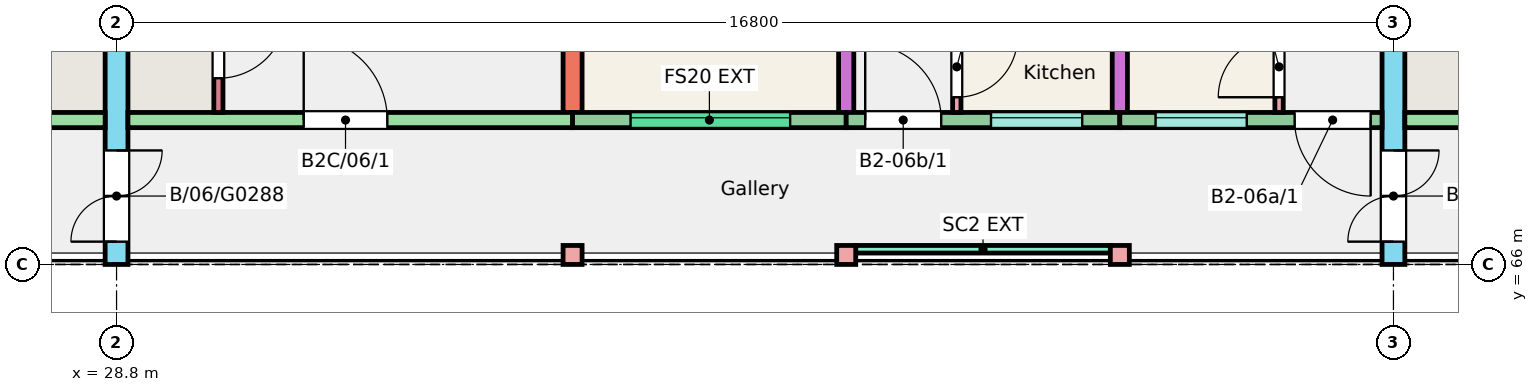
"""IFC4 building model, lengths in metres.
Left out: names, types, materials, properties, quantities, classifications, styles, units other than length and angle.
Written with IfcOpenShell. Run it as: python <this file> out.ifc"""

import sys

from ifc_helpers import new_model, si_unit, direction, frame, frame_2d, origin, origin_2d, place, context, subcontext, project, spatial, rectangle, extrude, element, fill, save


model = new_model("IFC4")
c1 = context("Model", 3, precision=1e-05, world=origin(), true_north=direction((0.0, 1.0)))
c2 = subcontext(c1, "Body", "Model", "MODEL_VIEW")
j1 = project(units=[si_unit("LENGTHUNIT", "METRE"), si_unit("PLANEANGLEUNIT", "RADIAN")], contexts=[c1])
p1 = place(None, origin())
s1 = spatial("IfcSite", under=j1, at=p1, CompositionType="ELEMENT")
p2 = place(p1, origin())
s2 = spatial("IfcBuilding", under=s1, at=p2, CompositionType="ELEMENT")
p3 = place(p2, frame((0.0, 0.0, 18.0)))
s3 = spatial("IfcBuildingStorey", under=s2, at=p3, CompositionType="ELEMENT", Elevation=18.0)
p4 = place(p3, frame((28.8, 66.0, 0.0), z_axis=(0.0, 0.0, 1.0), x_axis=(0.0, 1.0, 0.0)))
e1 = element("IfcWall", 1, at=p4, inside=s3, PredefinedType="SHEAR", context=c2, shape_type="SweptSolid", body=[
    extrude(rectangle(XDim=11.0, YDim=0.3, at=frame_2d((5.5, 0.0))), origin(), (0.0, 0.0, 1.0), 3.0),
])
p5 = place(p4, frame((0.3, 0.0, 0.0)))
e2 = element("IfcOpeningElement", 2, at=p5, cuts=e1, PredefinedType="OPENING", context=c2, shape_type="SweptSolid", body=[
    extrude(rectangle(XDim=1.2, YDim=2.1, at=frame_2d((0.6, 1.05))), frame((0.0, 0.16, 0.0), z_axis=(0.0, -1.0, 0.0), x_axis=(1.0, 0.0, 0.0)), (0.0, 0.0, 1.0), 0.32),
])
p6 = place(p3, frame((34.8, 68.0, 0.0), z_axis=(0.0, 0.0, 1.0), x_axis=(0.0, 1.0, 0.0)))
e3 = element("IfcWall", 3, at=p6, inside=s3, PredefinedType="SHEAR", context=c2, shape_type="SweptSolid", body=[
    extrude(rectangle(XDim=9.0, YDim=0.25, at=frame_2d((4.5, 0.0))), origin(), (0.0, 0.0, 1.0), 3.0),
])
p7 = place(p3, frame((38.4, 68.0, 0.0), z_axis=(0.0, 0.0, 1.0), x_axis=(0.0, 1.0, 0.0)))
e4 = element("IfcWall", 4, at=p7, inside=s3, PredefinedType="SHEAR", context=c2, shape_type="SweptSolid", body=[
    extrude(rectangle(XDim=9.0, YDim=0.2, at=frame_2d((4.5, 0.0))), origin(), (0.0, 0.0, 1.0), 3.0),
])
p8 = place(p7, frame((2.4, 0.0, 0.0)))
e5 = element("IfcOpeningElement", 5, at=p8, cuts=e4, PredefinedType="OPENING", context=c2, shape_type="SweptSolid", body=[
    extrude(rectangle(XDim=1.2, YDim=2.1, at=frame_2d((0.6, 1.05))), frame((0.0, 0.11, 0.0), z_axis=(0.0, -1.0, 0.0), x_axis=(1.0, 0.0, 0.0)), (0.0, 0.0, 1.0), 0.22),
])
p9 = place(p7, frame((6.4, 0.0, 0.0)))
e6 = element("IfcOpeningElement", 6, at=p9, cuts=e4, PredefinedType="OPENING", context=c2, shape_type="SweptSolid", body=[
    extrude(rectangle(XDim=1.2, YDim=2.1, at=frame_2d((0.6, 1.05))), frame((0.0, 0.11, 0.0), z_axis=(0.0, -1.0, 0.0), x_axis=(1.0, 0.0, 0.0)), (0.0, 0.0, 1.0), 0.22),
])
p10 = place(p3, frame((42.0, 68.0, 0.0), z_axis=(0.0, 0.0, 1.0), x_axis=(0.0, 1.0, 0.0)))
e7 = element("IfcWall", 7, at=p10, inside=s3, PredefinedType="SHEAR", context=c2, shape_type="SweptSolid", body=[
    extrude(rectangle(XDim=9.0, YDim=0.2, at=frame_2d((4.5, 0.0))), origin(), (0.0, 0.0, 1.0), 3.0),
])
p11 = place(p3, frame((45.6, 66.0, 0.0), z_axis=(0.0, 0.0, 1.0), x_axis=(0.0, 1.0, 0.0)))
e8 = element("IfcWall", 8, at=p11, inside=s3, PredefinedType="SHEAR", context=c2, shape_type="SweptSolid", body=[
    extrude(rectangle(XDim=11.0, YDim=0.3, at=frame_2d((5.5, 0.0))), origin(), (0.0, 0.0, 1.0), 3.0),
])
p12 = place(p11, frame((0.3, 0.0, 0.0)))
e9 = element("IfcOpeningElement", 9, at=p12, cuts=e8, PredefinedType="OPENING", context=c2, shape_type="SweptSolid", body=[
    extrude(rectangle(XDim=1.2, YDim=2.1, at=frame_2d((0.6, 1.05))), frame((0.0, 0.16, 0.0), z_axis=(0.0, -1.0, 0.0), x_axis=(1.0, 0.0, 0.0)), (0.0, 0.0, 1.0), 0.32),
])
p13 = place(p3, frame((22.8, 67.9, 0.0), z_axis=(0.0, 0.0, 1.0), x_axis=(1.0, 0.0, 0.0)))
e10 = element("IfcWall", 10, at=p13, inside=s3, PredefinedType="SHEAR", context=c2, shape_type="SweptSolid", body=[
    extrude(rectangle(XDim=5.85, YDim=0.2, at=frame_2d((2.925, 0.0))), origin(), (0.0, 0.0, 1.0), 3.0),
])
p14 = place(p13, frame((2.438, 0.0, 0.0)))
e11 = element("IfcOpeningElement", 11, at=p14, cuts=e10, PredefinedType="OPENING", context=c2, shape_type="SweptSolid", body=[
    extrude(rectangle(XDim=1.1, YDim=2.1, at=frame_2d((0.55, 1.05))), frame((0.0, 0.11, 0.0), z_axis=(0.0, -1.0, 0.0), x_axis=(1.0, 0.0, 0.0)), (0.0, 0.0, 1.0), 0.22),
])
p15 = place(p3, frame((28.95, 67.9, 0.0), z_axis=(0.0, 0.0, 1.0), x_axis=(1.0, 0.0, 0.0)))
e12 = element("IfcWall", 12, at=p15, inside=s3, PredefinedType="SHEAR", context=c2, shape_type="SweptSolid", body=[
    extrude(rectangle(XDim=5.85, YDim=0.2, at=frame_2d((2.925, 0.0))), origin(), (0.0, 0.0, 1.0), 3.0),
])
p16 = place(p15, frame((2.312, 0.0, 0.0)))
e13 = element("IfcOpeningElement", 13, at=p16, cuts=e12, PredefinedType="OPENING", context=c2, shape_type="SweptSolid", body=[
    extrude(rectangle(XDim=1.1, YDim=2.1, at=frame_2d((0.55, 1.05))), frame((0.0, 0.11, 0.0), z_axis=(0.0, -1.0, 0.0), x_axis=(1.0, 0.0, 0.0)), (0.0, 0.0, 1.0), 0.22),
])
p17 = place(p3, frame((30.14, 68.0, 0.0), z_axis=(0.0, 0.0, 1.0), x_axis=(0.0, 1.0, 0.0)))
e14 = element("IfcWall", 14, at=p17, inside=s3, PredefinedType="SHEAR", context=c2, shape_type="SweptSolid", body=[
    extrude(rectangle(XDim=1.72, YDim=0.12, at=frame_2d((0.86, 0.0))), origin(), (0.0, 0.0, 1.0), 3.0),
])
p18 = place(p17, frame((0.45, 0.0, 0.0)))
e15 = element("IfcOpeningElement", 15, at=p18, cuts=e14, PredefinedType="OPENING", context=c2, shape_type="SweptSolid", body=[
    extrude(rectangle(XDim=0.9, YDim=2.1, at=frame_2d((0.45, 1.05))), frame((0.0, 0.07, 0.0), z_axis=(0.0, -1.0, 0.0), x_axis=(1.0, 0.0, 0.0)), (0.0, 0.0, 1.0), 0.14),
])
p19 = place(p3, frame((34.8, 67.9, 0.0), z_axis=(0.0, 0.0, 1.0), x_axis=(1.0, 0.0, 0.0)))
e16 = element("IfcWall", 16, at=p19, inside=s3, PredefinedType="SOLIDWALL", context=c2, shape_type="SweptSolid", body=[
    extrude(rectangle(XDim=3.6, YDim=0.2, at=frame_2d((1.8, 0.0))), origin(), (0.0, 0.0, 1.0), 3.0),
])
p20 = place(p19, frame((0.762, 0.0, 1.2)))
e17 = element("IfcOpeningElement", 17, at=p20, cuts=e16, PredefinedType="OPENING", context=c2, shape_type="SweptSolid", body=[
    extrude(rectangle(XDim=2.1, YDim=1.2, at=frame_2d((1.05, 0.6))), frame((0.0, 0.11, 0.0), z_axis=(0.0, -1.0, 0.0), x_axis=(1.0, 0.0, 0.0)), (0.0, 0.0, 1.0), 0.22),
])
p21 = place(p3, frame((38.4, 67.9, 0.0), z_axis=(0.0, 0.0, 1.0), x_axis=(1.0, 0.0, 0.0)))
e18 = element("IfcWall", 18, at=p21, inside=s3, PredefinedType="SOLIDWALL", context=c2, shape_type="SweptSolid", body=[
    extrude(rectangle(XDim=3.6, YDim=0.2, at=frame_2d((1.8, 0.0))), origin(), (0.0, 0.0, 1.0), 3.0),
])
p22 = place(p21, frame((1.905, 0.0, 1.1)))
e19 = element("IfcOpeningElement", 19, at=p22, cuts=e18, PredefinedType="OPENING", context=c2, shape_type="SweptSolid", body=[
    extrude(rectangle(XDim=1.2, YDim=1.3, at=frame_2d((0.6, 0.65))), frame((0.0, 0.11, 0.0), z_axis=(0.0, -1.0, 0.0), x_axis=(1.0, 0.0, 0.0)), (0.0, 0.0, 1.0), 0.22),
])
p23 = place(p21, frame((0.25, 0.0, 0.0)))
e20 = element("IfcOpeningElement", 20, at=p23, cuts=e18, PredefinedType="OPENING", context=c2, shape_type="SweptSolid", body=[
    extrude(rectangle(XDim=1.0, YDim=2.1, at=frame_2d((0.5, 1.05))), frame((0.0, 0.11, 0.0), z_axis=(0.0, -1.0, 0.0), x_axis=(1.0, 0.0, 0.0)), (0.0, 0.0, 1.0), 0.22),
])
p24 = place(p3, frame((42.0, 67.9, 0.0), z_axis=(0.0, 0.0, 1.0), x_axis=(1.0, 0.0, 0.0)))
e21 = element("IfcWall", 21, at=p24, inside=s3, PredefinedType="SOLIDWALL", context=c2, shape_type="SweptSolid", body=[
    extrude(rectangle(XDim=3.45, YDim=0.2, at=frame_2d((1.725, 0.0))), origin(), (0.0, 0.0, 1.0), 3.0),
])
p25 = place(p24, frame((0.47, 0.0, 1.1)))
e22 = element("IfcOpeningElement", 22, at=p25, cuts=e21, PredefinedType="OPENING", context=c2, shape_type="SweptSolid", body=[
    extrude(rectangle(XDim=1.2, YDim=1.3, at=frame_2d((0.6, 0.65))), frame((0.0, 0.11, 0.0), z_axis=(0.0, -1.0, 0.0), x_axis=(1.0, 0.0, 0.0)), (0.0, 0.0, 1.0), 0.22),
])
p26 = place(p24, frame((2.3, 0.0, 0.0)))
e23 = element("IfcOpeningElement", 23, at=p26, cuts=e21, PredefinedType="OPENING", context=c2, shape_type="SweptSolid", body=[
    extrude(rectangle(XDim=1.0, YDim=2.1, at=frame_2d((0.5, 1.05))), frame((0.0, 0.11, 0.0), z_axis=(0.0, -1.0, 0.0), x_axis=(1.0, 0.0, 0.0)), (0.0, 0.0, 1.0), 0.22),
])
p27 = place(p3, frame((45.75, 67.9, 0.0), z_axis=(0.0, 0.0, 1.0), x_axis=(1.0, 0.0, 0.0)))
e24 = element("IfcWall", 24, at=p27, inside=s3, PredefinedType="SHEAR", context=c2, shape_type="SweptSolid", body=[
    extrude(rectangle(XDim=5.85, YDim=0.2, at=frame_2d((2.925, 0.0))), origin(), (0.0, 0.0, 1.0), 3.0),
])
p28 = place(p27, frame((2.312, 0.0, 0.0)))
e25 = element("IfcOpeningElement", 25, at=p28, cuts=e24, PredefinedType="OPENING", context=c2, shape_type="SweptSolid", body=[
    extrude(rectangle(XDim=1.1, YDim=2.1, at=frame_2d((0.55, 1.05))), frame((0.0, 0.11, 0.0), z_axis=(0.0, -1.0, 0.0), x_axis=(1.0, 0.0, 0.0)), (0.0, 0.0, 1.0), 0.22),
])
for number, where, z_axis, x_axis in (
    (26, (34.8, 66.125, 0.0), (0.0, 0.0, 1.0), (1.0, 0.0, 0.0)),
    (27, (38.4, 66.125, 0.0), (0.0, 0.0, 1.0), (1.0, 0.0, 0.0)),
    (28, (42.0, 66.125, 0.0), (0.0, 0.0, 1.0), (1.0, 0.0, 0.0)),
):
    element("IfcColumn", number, at=place(p3, frame(where, z_axis=z_axis, x_axis=x_axis)), inside=s3, PredefinedType="COLUMN", context=c2, shape_type="SweptSolid", body=[
        extrude(rectangle(XDim=0.25, YDim=0.25, at=origin_2d()), origin(), (0.0, 0.0, 1.0), 3.0),
    ])
p29 = place(p3, frame((38.525, 66.2, 0.0), z_axis=(0.0, 0.0, 1.0), x_axis=(1.0, 0.0, 0.0)))
e29 = element("IfcWall", 29, at=p29, inside=s3, PredefinedType="SOLIDWALL", context=c2, shape_type="SweptSolid", body=[
    extrude(rectangle(XDim=3.35, YDim=0.1, at=frame_2d((1.675, 0.0))), origin(), (0.0, 0.0, 1.0), 2.45),
])
p30 = place(p3, frame((44.095, 68.0, 0.0), z_axis=(0.0, 0.0, 1.0), x_axis=(0.0, 1.0, 0.0)))
e30 = element("IfcWall", 30, at=p30, inside=s3, PredefinedType="PARTITIONING", context=c2, shape_type="SweptSolid", body=[
    extrude(rectangle(XDim=4.5, YDim=0.11, at=frame_2d((2.25, 0.0))), origin(), (0.0, 0.0, 1.0), 2.8),
])
p31 = place(p30, frame((0.2, 0.0, 0.0)))
e31 = element("IfcOpeningElement", 31, at=p31, cuts=e30, PredefinedType="OPENING", context=c2, shape_type="SweptSolid", body=[
    extrude(rectangle(XDim=0.8, YDim=2.1, at=frame_2d((0.4, 1.05))), frame((0.0, 0.065, 0.0), z_axis=(0.0, -1.0, 0.0), x_axis=(1.0, 0.0, 0.0)), (0.0, 0.0, 1.0), 0.13),
])
p32 = place(p30, frame((3.55, 0.0, 0.0)))
e32 = element("IfcOpeningElement", 32, at=p32, cuts=e30, PredefinedType="OPENING", context=c2, shape_type="SweptSolid", body=[
    extrude(rectangle(XDim=0.8, YDim=2.1, at=frame_2d((0.4, 1.05))), frame((0.0, 0.065, 0.0), z_axis=(0.0, -1.0, 0.0), x_axis=(1.0, 0.0, 0.0)), (0.0, 0.0, 1.0), 0.13),
])
p33 = place(p3, frame((39.855, 68.0, 0.0), z_axis=(0.0, 0.0, 1.0), x_axis=(0.0, 1.0, 0.0)))
e33 = element("IfcWall", 33, at=p33, inside=s3, PredefinedType="PARTITIONING", context=c2, shape_type="SweptSolid", body=[
    extrude(rectangle(XDim=4.3, YDim=0.11, at=frame_2d((2.15, 0.0))), origin(), (0.0, 0.0, 1.0), 2.8),
])
p34 = place(p33, frame((0.2, 0.0, 0.0)))
e34 = element("IfcOpeningElement", 34, at=p34, cuts=e33, PredefinedType="OPENING", context=c2, shape_type="SweptSolid", body=[
    extrude(rectangle(XDim=0.8, YDim=2.1, at=frame_2d((0.4, 1.05))), frame((0.0, 0.065, 0.0), z_axis=(0.0, -1.0, 0.0), x_axis=(1.0, 0.0, 0.0)), (0.0, 0.0, 1.0), 0.13),
])
p35 = place(p33, frame((3.35, 0.0, 0.0)))
e35 = element("IfcOpeningElement", 35, at=p35, cuts=e33, PredefinedType="OPENING", context=c2, shape_type="SweptSolid", body=[
    extrude(rectangle(XDim=0.8, YDim=2.1, at=frame_2d((0.4, 1.05))), frame((0.0, 0.065, 0.0), z_axis=(0.0, -1.0, 0.0), x_axis=(1.0, 0.0, 0.0)), (0.0, 0.0, 1.0), 0.13),
])
p36 = place(p25, origin())
e36 = element("IfcWindow", 36, at=p36, inside=s3, PartitioningType="SINGLE_PANEL", PredefinedType="WINDOW", context=c2, shape_type="SweptSolid", body=[
    extrude(rectangle(XDim=1.2, YDim=1.3, at=frame_2d((0.6, 0.65))), frame((0.0, 0.06, 0.0), z_axis=(0.0, -1.0, 0.0), x_axis=(1.0, 0.0, 0.0)), (0.0, 0.0, 1.0), 0.06),
])
fill(e22, e36)
p37 = place(p20, origin())
e37 = element("IfcWindow", 37, at=p37, inside=s3, PartitioningType="SINGLE_PANEL", PredefinedType="WINDOW", context=c2, shape_type="SweptSolid", body=[
    extrude(rectangle(XDim=2.1, YDim=1.2, at=frame_2d((1.05, 0.6))), frame((0.0, 0.06, 0.0), z_axis=(0.0, -1.0, 0.0), x_axis=(1.0, 0.0, 0.0)), (0.0, 0.0, 1.0), 0.06),
])
fill(e17, e37)
p38 = place(p22, origin())
e38 = element("IfcWindow", 38, at=p38, inside=s3, PartitioningType="SINGLE_PANEL", PredefinedType="WINDOW", context=c2, shape_type="SweptSolid", body=[
    extrude(rectangle(XDim=1.2, YDim=1.3, at=frame_2d((0.6, 0.65))), frame((0.0, 0.06, 0.0), z_axis=(0.0, -1.0, 0.0), x_axis=(1.0, 0.0, 0.0)), (0.0, 0.0, 1.0), 0.06),
])
fill(e19, e38)
p39 = place(p26, origin())
e39 = element("IfcDoor", 39, at=p39, inside=s3, OperationType="SINGLE_SWING_RIGHT", PredefinedType="DOOR", context=c2, shape_type="SweptSolid", body=[
    extrude(rectangle(XDim=1.0, YDim=2.1, at=frame_2d((0.5, 1.05))), frame((0.0, 0.025, 0.0), z_axis=(0.0, -1.0, 0.0), x_axis=(1.0, 0.0, 0.0)), (0.0, 0.0, 1.0), 0.05),
])
fill(e23, e39)
p40 = place(p31, origin())
e40 = element("IfcDoor", 40, at=p40, inside=s3, OperationType="SINGLE_SWING_LEFT", PredefinedType="DOOR", context=c2, shape_type="SweptSolid", body=[
    extrude(rectangle(XDim=0.8, YDim=2.1, at=frame_2d((0.4, 1.05))), frame((0.0, 0.025, 0.0), z_axis=(0.0, -1.0, 0.0), x_axis=(1.0, 0.0, 0.0)), (0.0, 0.0, 1.0), 0.05),
])
fill(e31, e40)
p41 = place(p23, origin())
e41 = element("IfcDoor", 41, at=p41, inside=s3, OperationType="SINGLE_SWING_LEFT", PredefinedType="DOOR", context=c2, shape_type="SweptSolid", body=[
    extrude(rectangle(XDim=1.0, YDim=2.1, at=frame_2d((0.5, 1.05))), frame((0.0, 0.025, 0.0), z_axis=(0.0, -1.0, 0.0), x_axis=(1.0, 0.0, 0.0)), (0.0, 0.0, 1.0), 0.05),
])
fill(e20, e41)
p42 = place(p34, origin())
e42 = element("IfcDoor", 42, at=p42, inside=s3, OperationType="SINGLE_SWING_RIGHT", PredefinedType="DOOR", context=c2, shape_type="SweptSolid", body=[
    extrude(rectangle(XDim=0.8, YDim=2.1, at=frame_2d((0.4, 1.05))), frame((0.0, 0.025, 0.0), z_axis=(0.0, -1.0, 0.0), x_axis=(1.0, 0.0, 0.0)), (0.0, 0.0, 1.0), 0.05),
])
fill(e34, e42)
p43 = place(p16, origin())
e43 = element("IfcDoor", 43, at=p43, inside=s3, OperationType="SINGLE_SWING_LEFT", PredefinedType="DOOR", context=c2, shape_type="SweptSolid", body=[
    extrude(rectangle(XDim=1.1, YDim=2.1, at=frame_2d((0.55, 1.05))), frame((0.0, 0.025, 0.0), z_axis=(0.0, -1.0, 0.0), x_axis=(1.0, 0.0, 0.0)), (0.0, 0.0, 1.0), 0.05),
])
fill(e13, e43)
p44 = place(p18, origin())
e44 = element("IfcDoor", 44, at=p44, inside=s3, OperationType="SINGLE_SWING_RIGHT", PredefinedType="DOOR", context=c2, shape_type="SweptSolid", body=[
    extrude(rectangle(XDim=0.9, YDim=2.1, at=frame_2d((0.45, 1.05))), frame((0.0, 0.025, 0.0), z_axis=(0.0, -1.0, 0.0), x_axis=(1.0, 0.0, 0.0)), (0.0, 0.0, 1.0), 0.05),
])
fill(e15, e44)
p45 = place(p5, origin())
e45 = element("IfcDoor", 45, at=p45, inside=s3, OperationType="DOUBLE_DOOR_SINGLE_SWING", PredefinedType="DOOR", context=c2, shape_type="SweptSolid", body=[
    extrude(rectangle(XDim=1.2, YDim=2.1, at=frame_2d((0.6, 1.05))), frame((0.0, 0.025, 0.0), z_axis=(0.0, -1.0, 0.0), x_axis=(1.0, 0.0, 0.0)), (0.0, 0.0, 1.0), 0.05),
])
fill(e2, e45)
p46 = place(p12, origin())
e46 = element("IfcDoor", 46, at=p46, inside=s3, OperationType="DOUBLE_DOOR_SINGLE_SWING", PredefinedType="DOOR", context=c2, shape_type="SweptSolid", body=[
    extrude(rectangle(XDim=1.2, YDim=2.1, at=frame_2d((0.6, 1.05))), frame((0.0, 0.025, 0.0), z_axis=(0.0, -1.0, 0.0), x_axis=(1.0, 0.0, 0.0)), (0.0, 0.0, 1.0), 0.05),
])
fill(e9, e46)
save(model, sys.argv[1])
